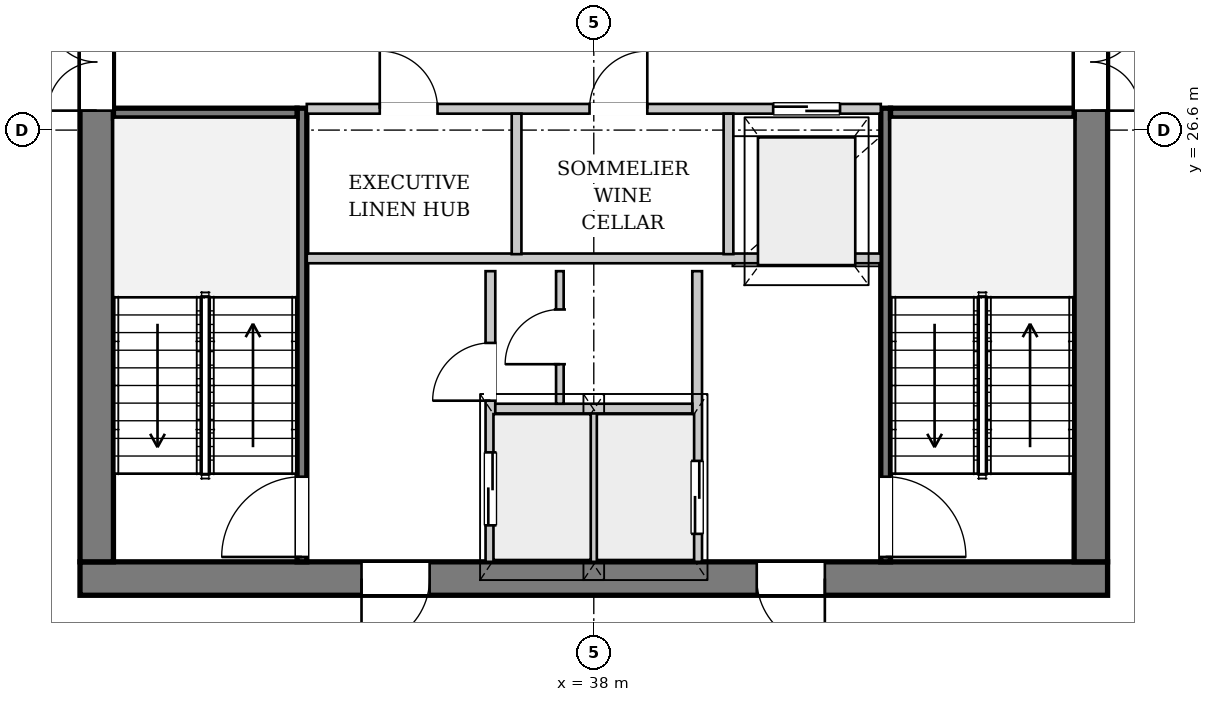
"""IFC4 building model, lengths in metres.
Left out: names, types, materials, properties, quantities, classifications, styles, units other than length and angle.
Written with IfcOpenShell. Run it as: python <this file> out.ifc"""

import sys

from ifc_helpers import new_model, si_unit, direction, frame, frame_2d, origin, place, context, subcontext, project, spatial, rectangle, extrude, source, transform, mapped, element, fill, save


model = new_model("IFC4")
c1 = context("Model", 3, precision=1e-05, world=origin(), true_north=direction((0.0, 1.0)))
c2 = subcontext(c1, "Body", "Model", "MODEL_VIEW")
j1 = project(units=[si_unit("LENGTHUNIT", "METRE"), si_unit("PLANEANGLEUNIT", "RADIAN")], contexts=[c1])
p1 = place(None, origin())
s1 = spatial("IfcSite", under=j1, at=p1, CompositionType="ELEMENT")
p2 = place(p1, origin())
s2 = spatial("IfcBuilding", under=s1, at=p2, CompositionType="ELEMENT")
p3 = place(p2, frame((0.0, 0.0, 164.35)))
s3 = spatial("IfcBuildingStorey", under=s2, at=p3, CompositionType="ELEMENT", Elevation=164.35)
p4 = place(p3, frame((52.943, 19.922, 0.0), z_axis=(0.0, 0.0, 1.0), x_axis=(-0.670163184214, -0.742213787614, 0.0)))
e1 = element("IfcWall", 1, at=p4, inside=s3, PredefinedType="SOLIDWALL", context=c2, shape_type="SweptSolid", body=[
    extrude(rectangle(XDim=23.472, YDim=0.32, at=frame_2d((11.736, 0.0))), origin(), (0.0, 0.0, 1.0), 2.722),
])
p5 = place(p4, frame((6.761, 0.0, 0.0)))
e2 = element("IfcOpeningElement", 2, at=p5, cuts=e1, PredefinedType="OPENING", context=c2, shape_type="SweptSolid", body=[
    extrude(rectangle(XDim=1.5, YDim=2.3, at=frame_2d((0.75, 1.15))), frame((0.0, 0.17, 0.0), z_axis=(0.0, -1.0, 0.0), x_axis=(1.0, 0.0, 0.0)), (0.0, 0.0, 1.0), 0.34),
])
p6 = place(p4, frame((17.669, 0.0, 0.252)))
e3 = element("IfcOpeningElement", 3, at=p6, cuts=e1, PredefinedType="OPENING", context=c2, shape_type="SweptSolid", body=[
    extrude(rectangle(XDim=2.6, YDim=2.35, at=frame_2d((1.3, 1.175))), frame((0.0, 0.17, 0.0), z_axis=(0.0, -1.0, 0.0), x_axis=(1.0, 0.0, 0.0)), (0.0, 0.0, 1.0), 0.34),
])
p7 = place(p3, frame((46.45, 19.225, 0.0), z_axis=(0.0, 0.0, 1.0), x_axis=(-1.0, 0.0, 0.0)))
e4 = element("IfcWall", 4, at=p7, inside=s3, PredefinedType="SHEAR", context=c2, shape_type="SweptSolid", body=[
    extrude(rectangle(XDim=16.9, YDim=0.55, at=frame_2d((8.45, 0.0))), origin(), (0.0, 0.0, 1.0), 3.33),
])
p8 = place(p7, frame((4.65, 0.0, 0.0)))
e5 = element("IfcOpeningElement", 5, at=p8, cuts=e4, PredefinedType="OPENING", context=c2, shape_type="SweptSolid", body=[
    extrude(rectangle(XDim=1.12, YDim=2.25, at=frame_2d((0.56, 1.125))), frame((0.0, 0.285, 0.0), z_axis=(0.0, -1.0, 0.0), x_axis=(1.0, 0.0, 0.0)), (0.0, 0.0, 1.0), 0.57),
])
p9 = place(p7, frame((11.15, 0.0, 0.0)))
e6 = element("IfcOpeningElement", 6, at=p9, cuts=e4, PredefinedType="OPENING", context=c2, shape_type="SweptSolid", body=[
    extrude(rectangle(XDim=1.12, YDim=2.25, at=frame_2d((0.56, 1.125))), frame((0.0, 0.285, 0.0), z_axis=(0.0, -1.0, 0.0), x_axis=(1.0, 0.0, 0.0)), (0.0, 0.0, 1.0), 0.57),
])
p10 = place(p3, frame((29.825, 19.5, 0.0), z_axis=(0.0, 0.0, 1.0), x_axis=(0.0, 1.0, 0.0)))
e7 = element("IfcWall", 7, at=p10, inside=s3, PredefinedType="SHEAR", context=c2, shape_type="SweptSolid", body=[
    extrude(rectangle(XDim=14.2, YDim=0.55, at=frame_2d((7.1, 0.0))), origin(), (0.0, 0.0, 1.0), 3.33),
])
p11 = place(p10, frame((7.42, 0.0, 0.0)))
e8 = element("IfcOpeningElement", 8, at=p11, cuts=e7, PredefinedType="OPENING", context=c2, shape_type="SweptSolid", body=[
    extrude(rectangle(XDim=1.6, YDim=2.2, at=frame_2d((0.8, 1.1))), frame((0.0, 0.285, 0.0), z_axis=(0.0, -1.0, 0.0), x_axis=(1.0, 0.0, 0.0)), (0.0, 0.0, 1.0), 0.57),
])
p12 = place(p3, frame((46.175, 33.7, 0.0), z_axis=(0.0, 0.0, 1.0), x_axis=(0.0, -1.0, 0.0)))
e9 = element("IfcWall", 9, at=p12, inside=s3, PredefinedType="SHEAR", context=c2, shape_type="SweptSolid", body=[
    extrude(rectangle(XDim=14.2, YDim=0.55, at=frame_2d((7.1, 0.0))), origin(), (0.0, 0.0, 1.0), 3.33),
])
p13 = place(p12, frame((5.18, 0.0, 0.0)))
e10 = element("IfcOpeningElement", 10, at=p13, cuts=e9, PredefinedType="OPENING", context=c2, shape_type="SweptSolid", body=[
    extrude(rectangle(XDim=1.6, YDim=2.2, at=frame_2d((0.8, 1.1))), frame((0.0, 0.285, 0.0), z_axis=(0.0, -1.0, 0.0), x_axis=(1.0, 0.0, 0.0)), (0.0, 0.0, 1.0), 0.57),
])
p14 = place(p12, frame((2.05, 0.0, 0.0)))
e11 = element("IfcOpeningElement", 11, at=p14, cuts=e9, PredefinedType="OPENING", context=c2, shape_type="SweptSolid", body=[
    extrude(rectangle(XDim=0.95, YDim=2.1, at=frame_2d((0.475, 1.05))), frame((0.0, 0.285, 0.0), z_axis=(0.0, -1.0, 0.0), x_axis=(1.0, 0.0, 0.0)), (0.0, 0.0, 1.0), 0.57),
])
p15 = place(p3, frame((33.2, 19.5, 0.0), z_axis=(0.0, 0.0, 1.0), x_axis=(0.0, 1.0, 0.0)))
e12 = element("IfcWall", 12, at=p15, inside=s3, PredefinedType="PARTITIONING", context=c2, shape_type="SweptSolid", body=[
    extrude(rectangle(XDim=7.46, YDim=0.16, at=frame_2d((3.73, 0.0))), origin(), (0.0, 0.0, 1.0), 3.33),
])
p16 = place(p15, frame((0.08, 0.0, 0.0)))
e13 = element("IfcOpeningElement", 13, at=p16, cuts=e12, PredefinedType="OPENING", context=c2, shape_type="SweptSolid", body=[
    extrude(rectangle(XDim=1.32, YDim=2.2, at=frame_2d((0.66, 1.1))), frame((0.0, 0.09, 0.0), z_axis=(0.0, -1.0, 0.0), x_axis=(1.0, 0.0, 0.0)), (0.0, 0.0, 1.0), 0.18),
])
p17 = place(p3, frame((30.1, 26.88, 0.0), z_axis=(0.0, 0.0, 1.0), x_axis=(1.0, 0.0, 0.0)))
e14 = element("IfcWall", 14, at=p17, inside=s3, PredefinedType="PARTITIONING", context=c2, shape_type="SweptSolid", body=[
    extrude(rectangle(XDim=3.02, YDim=0.16, at=frame_2d((1.51, 0.0))), origin(), (0.0, 0.0, 1.0), 3.33),
])
p18 = place(p3, frame((42.8, 26.96, 0.0), z_axis=(0.0, 0.0, 1.0), x_axis=(0.0, -1.0, 0.0)))
e15 = element("IfcWall", 15, at=p18, inside=s3, PredefinedType="PARTITIONING", context=c2, shape_type="SweptSolid", body=[
    extrude(rectangle(XDim=7.46, YDim=0.16, at=frame_2d((3.73, 0.0))), origin(), (0.0, 0.0, 1.0), 3.33),
])
p19 = place(p18, frame((6.06, 0.0, 0.0)))
e16 = element("IfcOpeningElement", 16, at=p19, cuts=e15, PredefinedType="OPENING", context=c2, shape_type="SweptSolid", body=[
    extrude(rectangle(XDim=1.32, YDim=2.2, at=frame_2d((0.66, 1.1))), frame((0.0, 0.09, 0.0), z_axis=(0.0, -1.0, 0.0), x_axis=(1.0, 0.0, 0.0)), (0.0, 0.0, 1.0), 0.18),
])
p20 = place(p3, frame((42.88, 26.88, 0.0), z_axis=(0.0, 0.0, 1.0), x_axis=(1.0, 0.0, 0.0)))
e17 = element("IfcWall", 17, at=p20, inside=s3, PredefinedType="PARTITIONING", context=c2, shape_type="SweptSolid", body=[
    extrude(rectangle(XDim=3.02, YDim=0.16, at=frame_2d((1.51, 0.0))), origin(), (0.0, 0.0, 1.0), 3.33),
])
p21 = place(p3, frame((36.3, 19.5, 0.0), z_axis=(0.0, 0.0, 1.0), x_axis=(0.0, 1.0, 0.0)))
e18 = element("IfcWall", 18, at=p21, inside=s3, PredefinedType="PARTITIONING", context=c2, shape_type="SweptSolid", body=[
    extrude(rectangle(XDim=4.78, YDim=0.16, at=frame_2d((2.39, 0.0))), origin(), (0.0, 0.0, 1.0), 3.33),
])
p22 = place(p21, frame((0.6, 0.0, 0.0)))
e19 = element("IfcOpeningElement", 19, at=p22, cuts=e18, PredefinedType="OPENING", context=c2, shape_type="SweptSolid", body=[
    extrude(rectangle(XDim=1.2, YDim=2.2, at=frame_2d((0.6, 1.1))), frame((0.0, 0.09, 0.0), z_axis=(0.0, -1.0, 0.0), x_axis=(1.0, 0.0, 0.0)), (0.0, 0.0, 1.0), 0.18),
])
p23 = place(p21, frame((2.65, 0.0, 0.0)))
e20 = element("IfcOpeningElement", 20, at=p23, cuts=e18, PredefinedType="OPENING", context=c2, shape_type="SweptSolid", body=[
    extrude(rectangle(XDim=0.95, YDim=2.1, at=frame_2d((0.475, 1.05))), frame((0.0, 0.09, 0.0), z_axis=(0.0, -1.0, 0.0), x_axis=(1.0, 0.0, 0.0)), (0.0, 0.0, 1.0), 0.18),
])
p24 = place(p3, frame((39.7, 24.28, 0.0), z_axis=(0.0, 0.0, 1.0), x_axis=(0.0, -1.0, 0.0)))
e21 = element("IfcWall", 21, at=p24, inside=s3, PredefinedType="PARTITIONING", context=c2, shape_type="SweptSolid", body=[
    extrude(rectangle(XDim=4.78, YDim=0.16, at=frame_2d((2.39, 0.0))), origin(), (0.0, 0.0, 1.0), 3.33),
])
p25 = place(p24, frame((3.12, 0.0, 0.0)))
e22 = element("IfcOpeningElement", 22, at=p25, cuts=e21, PredefinedType="OPENING", context=c2, shape_type="SweptSolid", body=[
    extrude(rectangle(XDim=1.2, YDim=2.2, at=frame_2d((0.6, 1.1))), frame((0.0, 0.09, 0.0), z_axis=(0.0, -1.0, 0.0), x_axis=(1.0, 0.0, 0.0)), (0.0, 0.0, 1.0), 0.18),
])
p26 = place(p3, frame((38.0, 19.5, 0.0), z_axis=(0.0, 0.0, 1.0), x_axis=(0.0, 1.0, 0.0)))
e23 = element("IfcWall", 23, at=p26, inside=s3, PredefinedType="PARTITIONING", context=c2, shape_type="SweptSolid", body=[
    extrude(rectangle(XDim=2.46, YDim=0.125, at=frame_2d((1.23, 0.0))), origin(), (0.0, 0.0, 1.0), 3.33),
])
p27 = place(p3, frame((36.38, 22.02, 0.0), z_axis=(0.0, 0.0, 1.0), x_axis=(1.0, 0.0, 0.0)))
e24 = element("IfcWall", 24, at=p27, inside=s3, PredefinedType="PARTITIONING", context=c2, shape_type="SweptSolid", body=[
    extrude(rectangle(XDim=3.24, YDim=0.16, at=frame_2d((1.62, 0.0))), origin(), (0.0, 0.0, 1.0), 3.33),
])
p28 = place(p3, frame((33.28, 24.49, 0.0), z_axis=(0.0, 0.0, 1.0), x_axis=(1.0, 0.0, 0.0)))
e25 = element("IfcWall", 25, at=p28, inside=s3, PredefinedType="PARTITIONING", context=c2, shape_type="SweptSolid", body=[
    extrude(rectangle(XDim=9.44, YDim=0.16, at=frame_2d((4.72, 0.0))), origin(), (0.0, 0.0, 1.0), 3.33),
])
p29 = place(p3, frame((37.442, 22.1, 0.0), z_axis=(0.0, 0.0, 1.0), x_axis=(0.0, 1.0, 0.0)))
e26 = element("IfcWall", 26, at=p29, inside=s3, PredefinedType="PARTITIONING", context=c2, shape_type="SweptSolid", body=[
    extrude(rectangle(XDim=2.18, YDim=0.125, at=frame_2d((1.09, 0.0))), origin(), (0.0, 0.0, 1.0), 3.33),
])
p30 = place(p29, frame((0.65, 0.0, 0.0)))
e27 = element("IfcOpeningElement", 27, at=p30, cuts=e26, PredefinedType="OPENING", context=c2, shape_type="SweptSolid", body=[
    extrude(rectangle(XDim=0.9, YDim=2.1, at=frame_2d((0.45, 1.05))), frame((0.0, 0.073, 0.0), z_axis=(0.0, -1.0, 0.0), x_axis=(1.0, 0.0, 0.0)), (0.0, 0.0, 1.0), 0.145),
])
p31 = place(p3, frame((33.28, 26.95, 0.0), z_axis=(0.0, 0.0, 1.0), x_axis=(1.0, 0.0, 0.0)))
e28 = element("IfcWall", 28, at=p31, inside=s3, PredefinedType="PARTITIONING", context=c2, shape_type="SweptSolid", body=[
    extrude(rectangle(XDim=9.44, YDim=0.16, at=frame_2d((4.72, 0.0))), origin(), (0.0, 0.0, 1.0), 3.33),
])
p32 = place(p31, frame((1.2, 0.0, 0.0)))
e29 = element("IfcOpeningElement", 29, at=p32, cuts=e28, PredefinedType="OPENING", context=c2, shape_type="SweptSolid", body=[
    extrude(rectangle(XDim=0.95, YDim=2.1, at=frame_2d((0.475, 1.05))), frame((0.0, 0.09, 0.0), z_axis=(0.0, -1.0, 0.0), x_axis=(1.0, 0.0, 0.0)), (0.0, 0.0, 1.0), 0.18),
])
p33 = place(p31, frame((4.65, 0.0, 0.0)))
e30 = element("IfcOpeningElement", 30, at=p33, cuts=e28, PredefinedType="OPENING", context=c2, shape_type="SweptSolid", body=[
    extrude(rectangle(XDim=0.95, YDim=2.1, at=frame_2d((0.475, 1.05))), frame((0.0, 0.09, 0.0), z_axis=(0.0, -1.0, 0.0), x_axis=(1.0, 0.0, 0.0)), (0.0, 0.0, 1.0), 0.18),
])
p34 = place(p31, frame((7.67, 0.0, 0.0)))
e31 = element("IfcOpeningElement", 31, at=p34, cuts=e28, PredefinedType="OPENING", context=c2, shape_type="SweptSolid", body=[
    extrude(rectangle(XDim=1.1, YDim=2.2, at=frame_2d((0.55, 1.1))), frame((0.0, 0.09, 0.0), z_axis=(0.0, -1.0, 0.0), x_axis=(1.0, 0.0, 0.0)), (0.0, 0.0, 1.0), 0.18),
])
for number, where, z_axis, x_axis in (
    (32, (36.73, 24.56, 0.0), (0.0, 0.0, 1.0), (0.0, 1.0, 0.0)),
    (33, (40.215, 24.56, 0.0), (0.0, 0.0, 1.0), (0.0, 1.0, 0.0)),
):
    element("IfcWall", number, at=place(p3, frame(where, z_axis=z_axis, x_axis=x_axis)), inside=s3, PredefinedType="PARTITIONING", context=c2, shape_type="SweptSolid", body=[
        extrude(rectangle(XDim=2.31, YDim=0.16, at=frame_2d((1.155, 0.0))), origin(), (0.0, 0.0, 1.0), 3.33),
    ])
m1 = source(origin(), c2, "Body", "SweptSolid", [
    extrude(rectangle(XDim=1.12, YDim=2.25, at=frame_2d((0.56, 1.125))), frame((0.0, 0.025, 0.0), z_axis=(0.0, -1.0, 0.0), x_axis=(1.0, 0.0, 0.0)), (0.0, 0.0, 1.0), 0.05),
])
p35 = place(p8, origin())
e34 = element("IfcDoor", 34, at=p35, inside=s3, OperationType="SINGLE_SWING_LEFT", PredefinedType="DOOR", context=c2, shape_type="MappedRepresentation", body=[
    mapped(m1, transform((0.0, 0.0, 0.0), x_axis=(1.0, 0.0, 0.0), y_axis=(0.0, 1.0, 0.0), z_axis=(0.0, 0.0, 1.0), scale=1.0)),
])
fill(e5, e34)
p36 = place(p9, origin())
e35 = element("IfcDoor", 35, at=p36, inside=s3, OperationType="SINGLE_SWING_RIGHT", PredefinedType="DOOR", context=c2, shape_type="MappedRepresentation", body=[
    mapped(m1, transform((0.0, 0.0, 0.0), x_axis=(1.0, 0.0, 0.0), y_axis=(0.0, 1.0, 0.0), z_axis=(0.0, 0.0, 1.0), scale=1.0)),
])
fill(e6, e35)
m2 = source(origin(), c2, "Body", "SweptSolid", [
    extrude(rectangle(XDim=1.6, YDim=2.2, at=frame_2d((0.8, 1.1))), frame((0.0, 0.025, 0.0), z_axis=(0.0, -1.0, 0.0), x_axis=(1.0, 0.0, 0.0)), (0.0, 0.0, 1.0), 0.05),
])
p37 = place(p11, origin())
e36 = element("IfcDoor", 36, at=p37, inside=s3, OperationType="DOUBLE_DOOR_SINGLE_SWING", PredefinedType="DOOR", context=c2, shape_type="MappedRepresentation", body=[
    mapped(m2, transform((0.0, 0.0, 0.0), x_axis=(1.0, 0.0, 0.0), y_axis=(0.0, 1.0, 0.0), z_axis=(0.0, 0.0, 1.0), scale=1.0)),
])
fill(e8, e36)
p38 = place(p13, origin())
e37 = element("IfcDoor", 37, at=p38, inside=s3, OperationType="DOUBLE_DOOR_SINGLE_SWING", PredefinedType="DOOR", context=c2, shape_type="MappedRepresentation", body=[
    mapped(m2, transform((0.0, 0.0, 0.0), x_axis=(1.0, 0.0, 0.0), y_axis=(0.0, 1.0, 0.0), z_axis=(0.0, 0.0, 1.0), scale=1.0)),
])
fill(e10, e37)
m3 = source(origin(), c2, "Body", "SweptSolid", [
    extrude(rectangle(XDim=1.32, YDim=2.2, at=frame_2d((0.66, 1.1))), frame((0.0, 0.025, 0.0), z_axis=(0.0, -1.0, 0.0), x_axis=(1.0, 0.0, 0.0)), (0.0, 0.0, 1.0), 0.05),
])
p39 = place(p16, origin())
e38 = element("IfcDoor", 38, at=p39, inside=s3, OperationType="SINGLE_SWING_LEFT", PredefinedType="DOOR", context=c2, shape_type="MappedRepresentation", body=[
    mapped(m3, transform((0.0, 0.0, 0.0), x_axis=(1.0, 0.0, 0.0), y_axis=(0.0, 1.0, 0.0), z_axis=(0.0, 0.0, 1.0), scale=1.0)),
])
fill(e13, e38)
p40 = place(p19, origin())
e39 = element("IfcDoor", 39, at=p40, inside=s3, OperationType="SINGLE_SWING_RIGHT", PredefinedType="DOOR", context=c2, shape_type="MappedRepresentation", body=[
    mapped(m3, transform((0.0, 0.0, 0.0), x_axis=(1.0, 0.0, 0.0), y_axis=(0.0, 1.0, 0.0), z_axis=(0.0, 0.0, 1.0), scale=1.0)),
])
fill(e16, e39)
m4 = source(origin(), c2, "Body", "SweptSolid", [
    extrude(rectangle(XDim=1.2, YDim=2.2, at=frame_2d((0.6, 1.1))), frame((0.0, 0.025, 0.0), z_axis=(0.0, -1.0, 0.0), x_axis=(1.0, 0.0, 0.0)), (0.0, 0.0, 1.0), 0.05),
])
p41 = place(p22, origin())
e40 = element("IfcDoor", 40, at=p41, inside=s3, OperationType="DOUBLE_DOOR_SLIDING", PredefinedType="DOOR", context=c2, shape_type="MappedRepresentation", body=[
    mapped(m4, transform((0.0, 0.0, 0.0), x_axis=(1.0, 0.0, 0.0), y_axis=(0.0, 1.0, 0.0), z_axis=(0.0, 0.0, 1.0), scale=1.0)),
])
fill(e19, e40)
m5 = source(origin(), c2, "Body", "SweptSolid", [
    extrude(rectangle(XDim=0.95, YDim=2.1, at=frame_2d((0.475, 1.05))), frame((0.0, 0.025, 0.0), z_axis=(0.0, -1.0, 0.0), x_axis=(1.0, 0.0, 0.0)), (0.0, 0.0, 1.0), 0.05),
])
p42 = place(p23, origin())
e41 = element("IfcDoor", 41, at=p42, inside=s3, OperationType="SINGLE_SWING_LEFT", PredefinedType="DOOR", context=c2, shape_type="MappedRepresentation", body=[
    mapped(m5, transform((0.0, 0.0, 0.0), x_axis=(1.0, 0.0, 0.0), y_axis=(0.0, 1.0, 0.0), z_axis=(0.0, 0.0, 1.0), scale=1.0)),
])
fill(e20, e41)
m6 = source(origin(), c2, "Body", "SweptSolid", [
    extrude(rectangle(XDim=0.9, YDim=2.1, at=frame_2d((0.45, 1.05))), frame((0.0, 0.025, 0.0), z_axis=(0.0, -1.0, 0.0), x_axis=(1.0, 0.0, 0.0)), (0.0, 0.0, 1.0), 0.05),
])
p43 = place(p30, origin())
e42 = element("IfcDoor", 42, at=p43, inside=s3, OperationType="SINGLE_SWING_LEFT", PredefinedType="DOOR", context=c2, shape_type="MappedRepresentation", body=[
    mapped(m6, transform((0.0, 0.0, 0.0), x_axis=(1.0, 0.0, 0.0), y_axis=(0.0, 1.0, 0.0), z_axis=(0.0, 0.0, 1.0), scale=1.0)),
])
fill(e27, e42)
p44 = place(p25, origin())
e43 = element("IfcDoor", 43, at=p44, inside=s3, OperationType="DOUBLE_DOOR_SLIDING", PredefinedType="DOOR", context=c2, shape_type="MappedRepresentation", body=[
    mapped(m4, transform((0.0, 0.0, 0.0), x_axis=(1.0, 0.0, 0.0), y_axis=(0.0, 1.0, 0.0), z_axis=(0.0, 0.0, 1.0), scale=1.0)),
])
fill(e22, e43)
p45 = place(p32, origin())
e44 = element("IfcDoor", 44, at=p45, inside=s3, OperationType="SINGLE_SWING_LEFT", PredefinedType="DOOR", context=c2, shape_type="MappedRepresentation", body=[
    mapped(m5, transform((0.0, 0.0, 0.0), x_axis=(1.0, 0.0, 0.0), y_axis=(0.0, 1.0, 0.0), z_axis=(0.0, 0.0, 1.0), scale=1.0)),
])
fill(e29, e44)
p46 = place(p33, origin())
e45 = element("IfcDoor", 45, at=p46, inside=s3, OperationType="SINGLE_SWING_RIGHT", PredefinedType="DOOR", context=c2, shape_type="MappedRepresentation", body=[
    mapped(m5, transform((0.0, 0.0, 0.0), x_axis=(1.0, 0.0, 0.0), y_axis=(0.0, 1.0, 0.0), z_axis=(0.0, 0.0, 1.0), scale=1.0)),
])
fill(e30, e45)
m7 = source(origin(), c2, "Body", "SweptSolid", [
    extrude(rectangle(XDim=1.1, YDim=2.2, at=frame_2d((0.55, 1.1))), frame((0.0, 0.025, 0.0), z_axis=(0.0, -1.0, 0.0), x_axis=(1.0, 0.0, 0.0)), (0.0, 0.0, 1.0), 0.05),
])
p47 = place(p34, origin())
e46 = element("IfcDoor", 46, at=p47, inside=s3, OperationType="DOUBLE_DOOR_SLIDING", PredefinedType="DOOR", context=c2, shape_type="MappedRepresentation", body=[
    mapped(m7, transform((0.0, 0.0, 0.0), x_axis=(1.0, 0.0, 0.0), y_axis=(0.0, 1.0, 0.0), z_axis=(0.0, 0.0, 1.0), scale=1.0)),
])
fill(e31, e46)
save(model, sys.argv[1])
